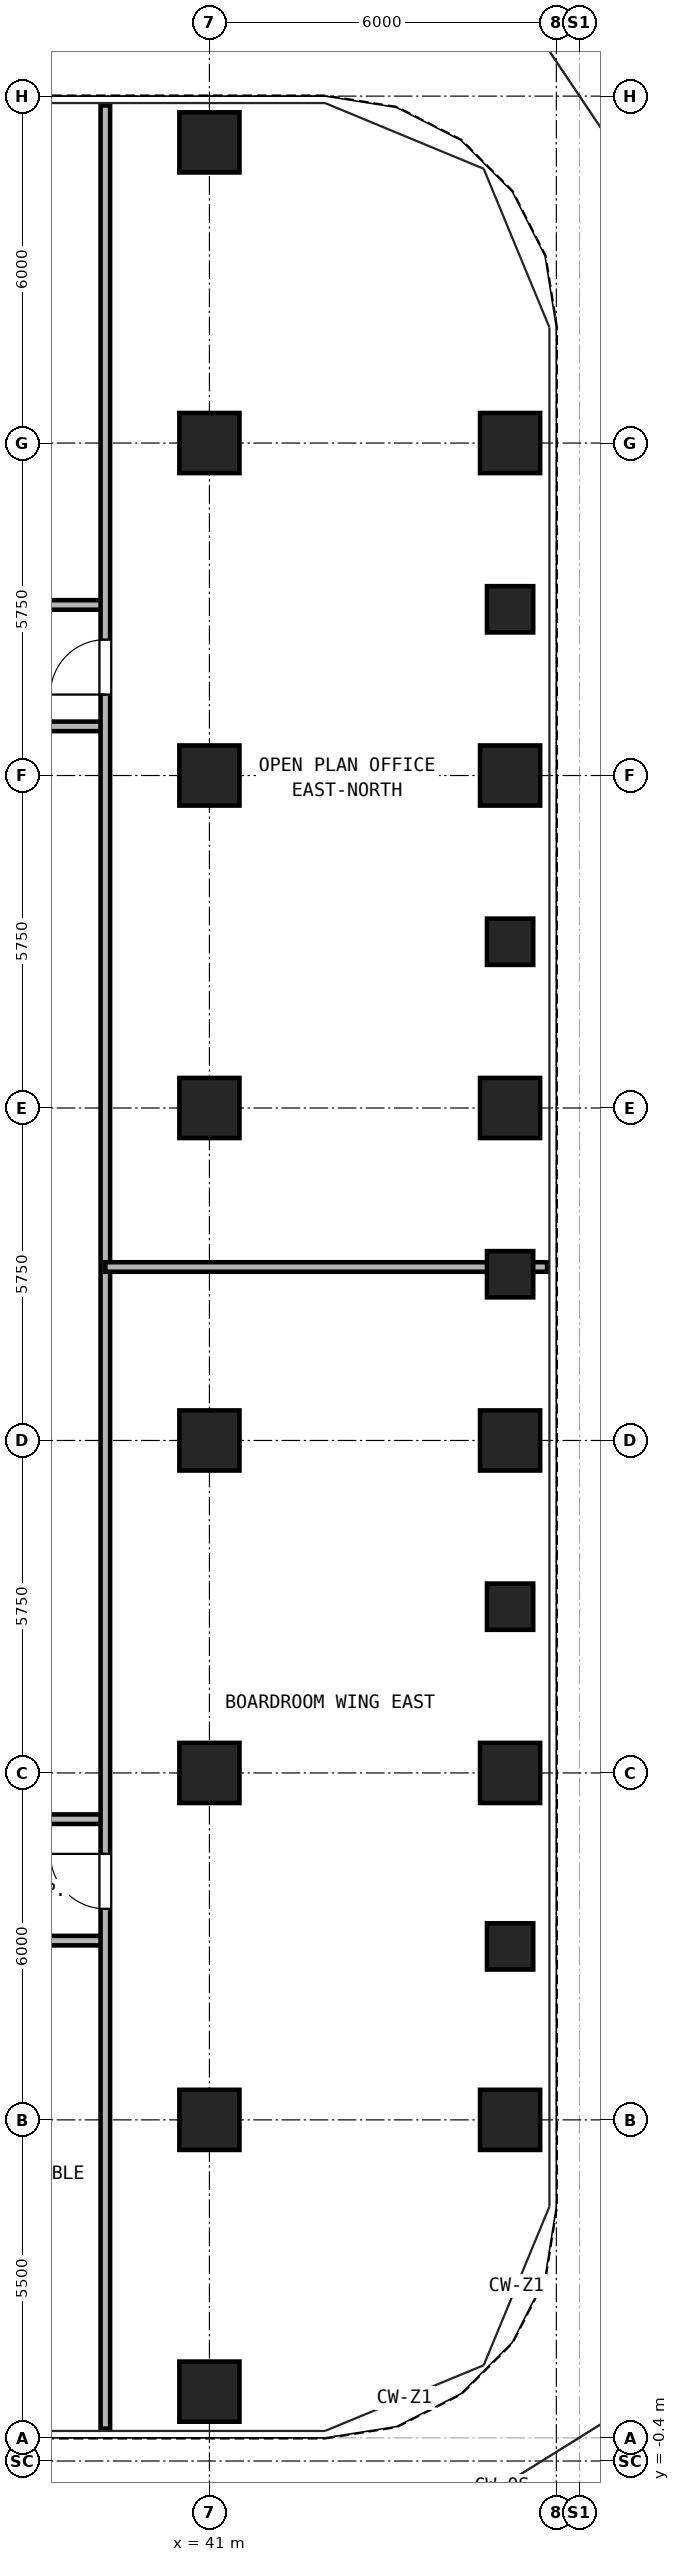
"""IFC4 building model, lengths in metres.
Left out: names, types, materials, properties, quantities, classifications, styles, units other than length and angle.
Written with IfcOpenShell. Run it as: python <this file> out.ifc"""

import sys

from ifc_helpers import new_model, si_unit, direction, frame, frame_2d, origin, origin_2d, place, context, subcontext, project, spatial, rectangle, hollow_rectangle, extrude, source, transform, mapped, element, fill, save


model = new_model("IFC4")
c1 = context("Model", 3, precision=1e-05, world=origin(), true_north=direction((0.0, 1.0)))
c2 = subcontext(c1, "Body", "Model", "MODEL_VIEW")
j1 = project(units=[si_unit("LENGTHUNIT", "METRE"), si_unit("PLANEANGLEUNIT", "RADIAN")], contexts=[c1])
p1 = place(None, origin())
s1 = spatial("IfcSite", under=j1, at=p1, CompositionType="ELEMENT")
p2 = place(p1, origin())
s2 = spatial("IfcBuilding", under=s1, at=p2, CompositionType="ELEMENT")
p3 = place(p2, frame((0.0, 0.0, 69.3)))
s3 = spatial("IfcBuildingStorey", under=s2, at=p3, CompositionType="ELEMENT", Elevation=69.3)
m1 = source(origin(), c2, "Body", "SweptSolid", [
    extrude(hollow_rectangle(XDim=1.04, YDim=1.04, WallThickness=0.065, at=origin_2d()), origin(), (0.0, 0.0, 1.0), 3.32),
])
for number, where, z_axis, x_axis in (
    (1, (41.0, 0.8, 0.0), (0.0, 0.0, 1.0), (1.0, 0.0, 0.0)),
    (2, (41.0, 39.7, 0.0), (0.0, 0.0, 1.0), (1.0, 0.0, 0.0)),
    (3, (46.2, 5.5, 0.0), (0.0, 0.0, 1.0), (1.0, 0.0, 0.0)),
    (4, (46.2, 11.5, 0.0), (0.0, 0.0, 1.0), (1.0, 0.0, 0.0)),
    (5, (46.2, 17.25, 0.0), (0.0, 0.0, 1.0), (1.0, 0.0, 0.0)),
    (6, (46.2, 23.0, 0.0), (0.0, 0.0, 1.0), (1.0, 0.0, 0.0)),
    (7, (46.2, 28.75, 0.0), (0.0, 0.0, 1.0), (1.0, 0.0, 0.0)),
    (8, (46.2, 34.5, 0.0), (0.0, 0.0, 1.0), (1.0, 0.0, 0.0)),
    (9, (41.0, 5.5, 0.0), (0.0, 0.0, 1.0), (1.0, 0.0, 0.0)),
    (10, (41.0, 11.5, 0.0), (0.0, 0.0, 1.0), (1.0, 0.0, 0.0)),
    (11, (41.0, 17.25, 0.0), (0.0, 0.0, 1.0), (1.0, 0.0, 0.0)),
    (12, (41.0, 23.0, 0.0), (0.0, 0.0, 1.0), (1.0, 0.0, 0.0)),
    (13, (41.0, 28.75, 0.0), (0.0, 0.0, 1.0), (1.0, 0.0, 0.0)),
    (14, (41.0, 34.5, 0.0), (0.0, 0.0, 1.0), (1.0, 0.0, 0.0)),
):
    element("IfcColumn", number, at=place(p3, frame(where, z_axis=z_axis, x_axis=x_axis)), inside=s3, PredefinedType="COLUMN", context=c2, shape_type="MappedRepresentation", body=[
        mapped(m1, transform((0.0, 0.0, 0.0), x_axis=(1.0, 0.0, 0.0), y_axis=(0.0, 1.0, 0.0), z_axis=(0.0, 0.0, 1.0), scale=1.0)),
    ])
m2 = source(origin(), c2, "Body", "SweptSolid", [
    extrude(hollow_rectangle(XDim=0.8, YDim=0.8, WallThickness=0.045, at=origin_2d()), origin(), (0.0, 0.0, 1.0), 3.32),
])
for number, where, z_axis, x_axis in (
    (15, (46.2, 8.5, 0.0), (0.0, 0.0, 1.0), (1.0, 0.0, 0.0)),
    (16, (46.2, 14.375, 0.0), (0.0, 0.0, 1.0), (1.0, 0.0, 0.0)),
    (17, (46.2, 20.125, 0.0), (0.0, 0.0, 1.0), (1.0, 0.0, 0.0)),
    (18, (46.2, 25.875, 0.0), (0.0, 0.0, 1.0), (1.0, 0.0, 0.0)),
    (19, (46.2, 31.625, 0.0), (0.0, 0.0, 1.0), (1.0, 0.0, 0.0)),
):
    element("IfcColumn", number, at=place(p3, frame(where, z_axis=z_axis, x_axis=x_axis)), inside=s3, PredefinedType="COLUMN", context=c2, shape_type="MappedRepresentation", body=[
        mapped(m2, transform((0.0, 0.0, 0.0), x_axis=(1.0, 0.0, 0.0), y_axis=(0.0, 1.0, 0.0), z_axis=(0.0, 0.0, 1.0), scale=1.0)),
    ])
p4 = place(p3, frame((7.8, 8.6, 0.0), z_axis=(0.0, 0.0, 1.0), x_axis=(1.0, 0.0, 0.0)))
e20 = element("IfcWall", 20, at=p4, inside=s3, PredefinedType="PARTITIONING", context=c2, shape_type="SweptSolid", body=[
    extrude(rectangle(XDim=31.4, YDim=0.165, at=frame_2d((15.7, 0.0))), origin(), (0.0, 0.0, 1.0), 2.898),
])
p5 = place(p4, frame((2.6, 0.0, 0.0)))
e21 = element("IfcOpeningElement", 21, at=p5, cuts=e20, PredefinedType="OPENING", context=c2, shape_type="SweptSolid", body=[
    extrude(rectangle(XDim=0.95, YDim=2.15, at=frame_2d((0.475, 1.075))), frame((0.0, 0.093, 0.0), z_axis=(0.0, -1.0, 0.0), x_axis=(1.0, 0.0, 0.0)), (0.0, 0.0, 1.0), 0.185),
])
p6 = place(p4, frame((8.8, 0.0, 0.0)))
e22 = element("IfcOpeningElement", 22, at=p6, cuts=e20, PredefinedType="OPENING", context=c2, shape_type="SweptSolid", body=[
    extrude(rectangle(XDim=0.95, YDim=2.15, at=frame_2d((0.475, 1.075))), frame((0.0, 0.093, 0.0), z_axis=(0.0, -1.0, 0.0), x_axis=(1.0, 0.0, 0.0)), (0.0, 0.0, 1.0), 0.185),
])
p7 = place(p4, frame((15.0, 0.0, 0.0)))
e23 = element("IfcOpeningElement", 23, at=p7, cuts=e20, PredefinedType="OPENING", context=c2, shape_type="SweptSolid", body=[
    extrude(rectangle(XDim=0.95, YDim=2.15, at=frame_2d((0.475, 1.075))), frame((0.0, 0.093, 0.0), z_axis=(0.0, -1.0, 0.0), x_axis=(1.0, 0.0, 0.0)), (0.0, 0.0, 1.0), 0.185),
])
p8 = place(p4, frame((21.2, 0.0, 0.0)))
e24 = element("IfcOpeningElement", 24, at=p8, cuts=e20, PredefinedType="OPENING", context=c2, shape_type="SweptSolid", body=[
    extrude(rectangle(XDim=0.95, YDim=2.15, at=frame_2d((0.475, 1.075))), frame((0.0, 0.093, 0.0), z_axis=(0.0, -1.0, 0.0), x_axis=(1.0, 0.0, 0.0)), (0.0, 0.0, 1.0), 0.185),
])
p9 = place(p4, frame((26.2, 0.0, 0.0)))
e25 = element("IfcOpeningElement", 25, at=p9, cuts=e20, PredefinedType="OPENING", context=c2, shape_type="SweptSolid", body=[
    extrude(rectangle(XDim=0.95, YDim=2.15, at=frame_2d((0.475, 1.075))), frame((0.0, 0.093, 0.0), z_axis=(0.0, -1.0, 0.0), x_axis=(1.0, 0.0, 0.0)), (0.0, 0.0, 1.0), 0.185),
])
p10 = place(p4, frame((29.5, 0.0, 0.0)))
e26 = element("IfcOpeningElement", 26, at=p10, cuts=e20, PredefinedType="OPENING", context=c2, shape_type="SweptSolid", body=[
    extrude(rectangle(XDim=0.92, YDim=2.1, at=frame_2d((0.46, 1.05))), frame((0.0, 0.093, 0.0), z_axis=(0.0, -1.0, 0.0), x_axis=(1.0, 0.0, 0.0)), (0.0, 0.0, 1.0), 0.185),
])
p11 = place(p3, frame((7.8, 31.7, 0.0), z_axis=(0.0, 0.0, 1.0), x_axis=(1.0, 0.0, 0.0)))
e27 = element("IfcWall", 27, at=p11, inside=s3, PredefinedType="PARTITIONING", context=c2, shape_type="SweptSolid", body=[
    extrude(rectangle(XDim=31.4, YDim=0.165, at=frame_2d((15.7, 0.0))), origin(), (0.0, 0.0, 1.0), 2.898),
])
p12 = place(p11, frame((3.85, 0.0, 0.0)))
e28 = element("IfcOpeningElement", 28, at=p12, cuts=e27, PredefinedType="OPENING", context=c2, shape_type="SweptSolid", body=[
    extrude(rectangle(XDim=0.95, YDim=2.15, at=frame_2d((0.475, 1.075))), frame((0.0, 0.093, 0.0), z_axis=(0.0, -1.0, 0.0), x_axis=(1.0, 0.0, 0.0)), (0.0, 0.0, 1.0), 0.185),
])
p13 = place(p11, frame((12.2, 0.0, 0.0)))
e29 = element("IfcOpeningElement", 29, at=p13, cuts=e27, PredefinedType="OPENING", context=c2, shape_type="SweptSolid", body=[
    extrude(rectangle(XDim=0.95, YDim=2.15, at=frame_2d((0.475, 1.075))), frame((0.0, 0.093, 0.0), z_axis=(0.0, -1.0, 0.0), x_axis=(1.0, 0.0, 0.0)), (0.0, 0.0, 1.0), 0.185),
])
p14 = place(p11, frame((20.2, 0.0, 0.0)))
e30 = element("IfcOpeningElement", 30, at=p14, cuts=e27, PredefinedType="OPENING", context=c2, shape_type="SweptSolid", body=[
    extrude(rectangle(XDim=0.95, YDim=2.15, at=frame_2d((0.475, 1.075))), frame((0.0, 0.093, 0.0), z_axis=(0.0, -1.0, 0.0), x_axis=(1.0, 0.0, 0.0)), (0.0, 0.0, 1.0), 0.185),
])
p15 = place(p11, frame((27.55, 0.0, 0.0)))
e31 = element("IfcOpeningElement", 31, at=p15, cuts=e27, PredefinedType="OPENING", context=c2, shape_type="SweptSolid", body=[
    extrude(rectangle(XDim=0.92, YDim=2.1, at=frame_2d((0.46, 1.05))), frame((0.0, 0.093, 0.0), z_axis=(0.0, -1.0, 0.0), x_axis=(1.0, 0.0, 0.0)), (0.0, 0.0, 1.0), 0.185),
])
for number, where, z_axis, x_axis in (
    (32, (30.7, 10.7, 0.0), (0.0, 0.0, 1.0), (1.0, 0.0, 0.0)),
    (33, (30.7, 29.6, 0.0), (0.0, 0.0, 1.0), (1.0, 0.0, 0.0)),
):
    element("IfcWall", number, at=place(p3, frame(where, z_axis=z_axis, x_axis=x_axis)), inside=s3, PredefinedType="PARTITIONING", context=c2, shape_type="SweptSolid", body=[
        extrude(rectangle(XDim=8.5, YDim=0.165, at=frame_2d((4.25, 0.0))), origin(), (0.0, 0.0, 1.0), 3.32),
    ])
p16 = place(p3, frame((39.2, 0.16, 0.0), z_axis=(0.0, 0.0, 1.0), x_axis=(0.0, 1.0, 0.0)))
e34 = element("IfcWall", 34, at=p16, inside=s3, PredefinedType="PARTITIONING", context=c2, shape_type="SweptSolid", body=[
    extrude(rectangle(XDim=40.18, YDim=0.165, at=frame_2d((20.09, 0.0))), origin(), (0.0, 0.0, 1.0), 3.32),
])
p17 = place(p16, frame((8.99, 0.0, 0.0)))
e35 = element("IfcOpeningElement", 35, at=p17, cuts=e34, PredefinedType="OPENING", context=c2, shape_type="SweptSolid", body=[
    extrude(rectangle(XDim=0.95, YDim=2.15, at=frame_2d((0.475, 1.075))), frame((0.0, 0.093, 0.0), z_axis=(0.0, -1.0, 0.0), x_axis=(1.0, 0.0, 0.0)), (0.0, 0.0, 1.0), 0.185),
])
p18 = place(p16, frame((29.99, 0.0, 0.0)))
e36 = element("IfcOpeningElement", 36, at=p18, cuts=e34, PredefinedType="OPENING", context=c2, shape_type="SweptSolid", body=[
    extrude(rectangle(XDim=0.95, YDim=2.15, at=frame_2d((0.475, 1.075))), frame((0.0, 0.093, 0.0), z_axis=(0.0, -1.0, 0.0), x_axis=(1.0, 0.0, 0.0)), (0.0, 0.0, 1.0), 0.185),
])
p19 = place(p3, frame((39.2, 20.25, 0.0), z_axis=(0.0, 0.0, 1.0), x_axis=(1.0, 0.0, 0.0)))
e37 = element("IfcWall", 37, at=p19, inside=s3, PredefinedType="PARTITIONING", context=c2, shape_type="SweptSolid", body=[
    extrude(rectangle(XDim=7.64, YDim=0.165, at=frame_2d((3.82, 0.0))), origin(), (0.0, 0.0, 1.0), 2.898),
])
p20 = place(p17, origin())
e38 = element("IfcDoor", 38, at=p20, inside=s3, OperationType="SINGLE_SWING_RIGHT", PredefinedType="DOOR", context=c2, shape_type="SweptSolid", body=[
    extrude(rectangle(XDim=0.95, YDim=2.15, at=frame_2d((0.475, 1.075))), frame((0.0, 0.025, 0.0), z_axis=(0.0, -1.0, 0.0), x_axis=(1.0, 0.0, 0.0)), (0.0, 0.0, 1.0), 0.05),
])
fill(e35, e38)
p21 = place(p18, origin())
e39 = element("IfcDoor", 39, at=p21, inside=s3, OperationType="SINGLE_SWING_LEFT", PredefinedType="DOOR", context=c2, shape_type="SweptSolid", body=[
    extrude(rectangle(XDim=0.95, YDim=2.15, at=frame_2d((0.475, 1.075))), frame((0.0, 0.025, 0.0), z_axis=(0.0, -1.0, 0.0), x_axis=(1.0, 0.0, 0.0)), (0.0, 0.0, 1.0), 0.05),
])
fill(e36, e39)
save(model, sys.argv[1])
